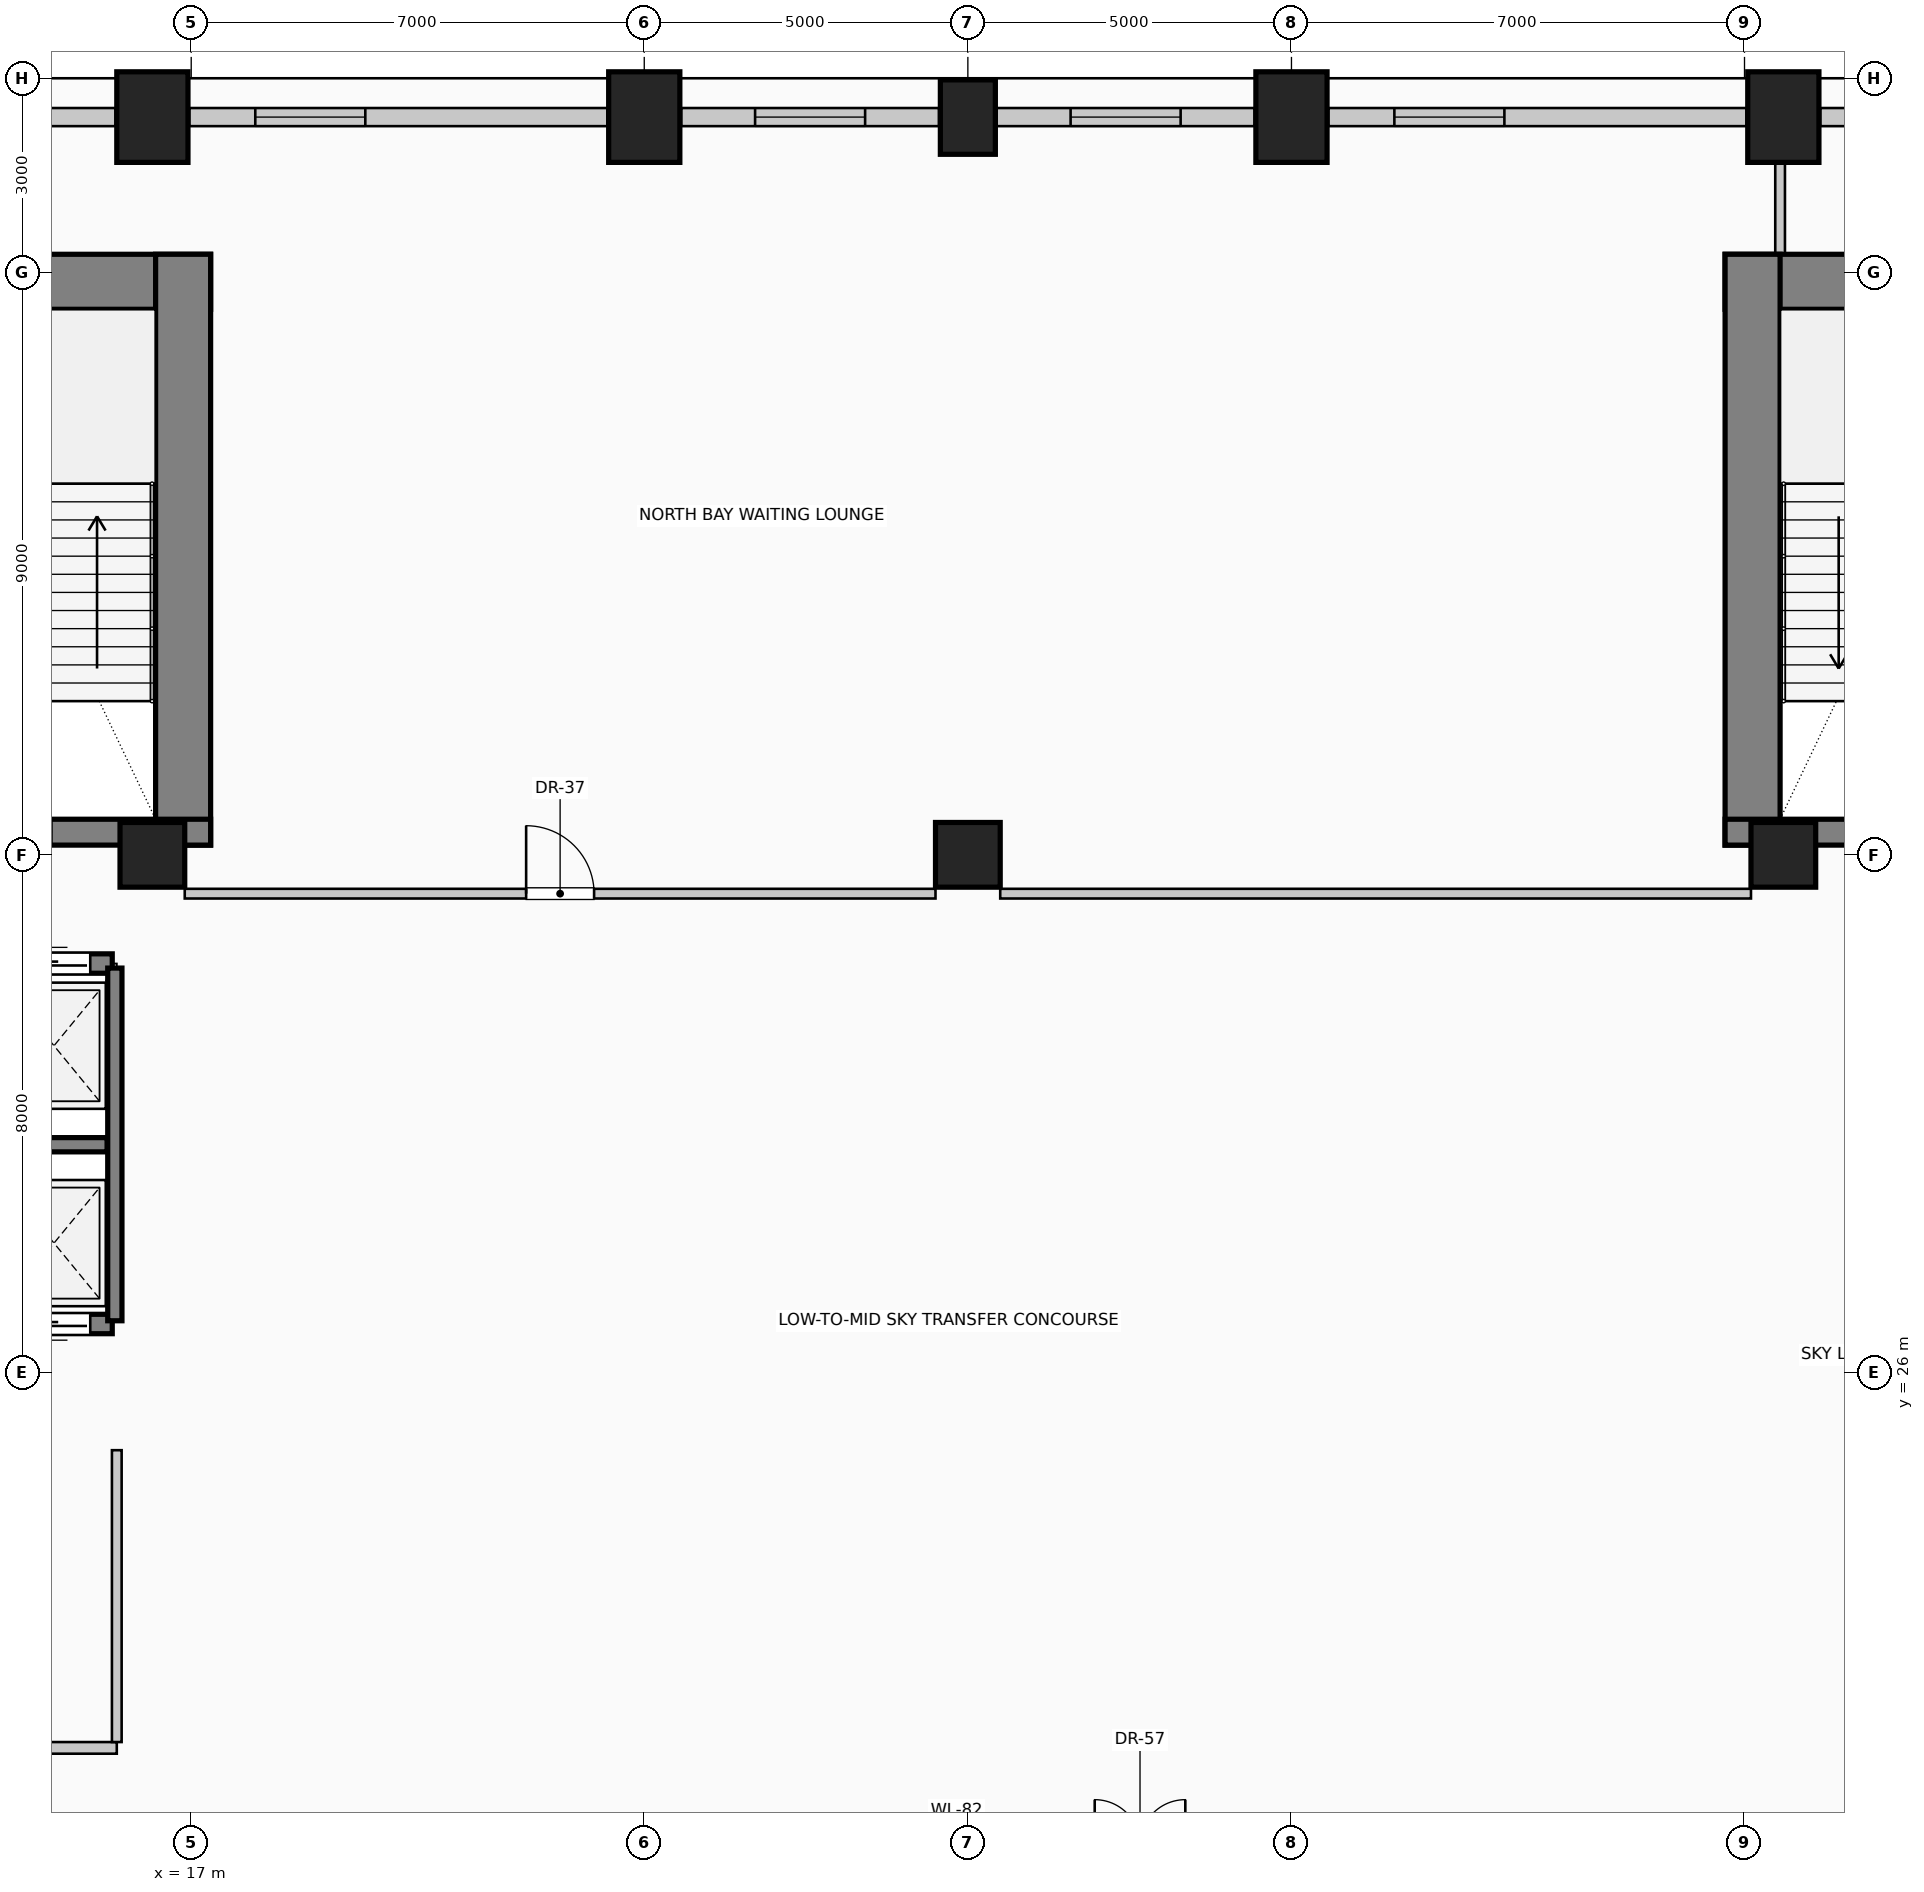
"""IFC4 building model, lengths in metres.
Left out: names, types, materials, properties, quantities, classifications, styles, units other than length and angle.
Written with IfcOpenShell. Run it as: python <this file> out.ifc"""

import sys

from ifc_helpers import new_model, si_unit, direction, frame, frame_2d, origin, origin_2d, place, context, subcontext, project, spatial, rectangle, circle, extrude, element, fill, save


model = new_model("IFC4")
c1 = context("Model", 3, precision=1e-05, world=origin(), true_north=direction((0.0, 1.0)))
c2 = subcontext(c1, "Body", "Model", "MODEL_VIEW")
j1 = project(units=[si_unit("LENGTHUNIT", "METRE"), si_unit("PLANEANGLEUNIT", "RADIAN")], contexts=[c1])
p1 = place(None, origin())
s1 = spatial("IfcSite", under=j1, at=p1, CompositionType="ELEMENT")
p2 = place(p1, origin())
s2 = spatial("IfcBuilding", under=s1, at=p2, CompositionType="ELEMENT")
p3 = place(p2, frame((0.0, 0.0, 87.8)))
s3 = spatial("IfcBuildingStorey", under=s2, at=p3, CompositionType="ELEMENT", Elevation=87.8)
p4 = place(p3, frame((2.7, 42.855, 0.0), z_axis=(0.0, 0.0, 1.0), x_axis=(1.0, 0.0, 0.0)))
e1 = element("IfcWall", 1, at=p4, inside=s3, PredefinedType="SHEAR", context=c2, shape_type="SweptSolid", body=[
    extrude(rectangle(XDim=14.6, YDim=0.85, at=frame_2d((7.3, 0.0))), origin(), (0.0, 0.0, 1.0), 4.8),
])
p5 = place(p3, frame((16.875, 34.15, 0.0), z_axis=(0.0, 0.0, 1.0), x_axis=(0.0, 1.0, 0.0)))
e2 = element("IfcWall", 2, at=p5, inside=s3, PredefinedType="SHEAR", context=c2, shape_type="SweptSolid", body=[
    extrude(rectangle(XDim=9.13, YDim=0.85, at=frame_2d((4.565, 0.0))), origin(), (0.0, 0.0, 1.0), 4.8),
])
p6 = place(p3, frame((12.29, 34.35, 0.0), z_axis=(0.0, 0.0, 1.0), x_axis=(1.0, 0.0, 0.0)))
e3 = element("IfcWall", 3, at=p6, inside=s3, PredefinedType="SHEAR", context=c2, shape_type="SweptSolid", body=[
    extrude(rectangle(XDim=5.01, YDim=0.4, at=frame_2d((2.505, 0.0))), origin(), (0.0, 0.0, 1.0), 4.8),
])
p7 = place(p6, frame((1.4, 0.0, 0.0)))
e4 = element("IfcOpeningElement", 4, at=p7, cuts=e3, PredefinedType="OPENING", context=c2, shape_type="SweptSolid", body=[
    extrude(rectangle(XDim=1.15, YDim=2.2, at=frame_2d((0.575, 1.1))), frame((0.0, 0.21, 0.0), z_axis=(0.0, -1.0, 0.0), x_axis=(1.0, 0.0, 0.0)), (0.0, 0.0, 1.0), 0.42),
])
p8 = place(p3, frame((40.7, 42.855, 0.0), z_axis=(0.0, 0.0, 1.0), x_axis=(1.0, 0.0, 0.0)))
e5 = element("IfcWall", 5, at=p8, inside=s3, PredefinedType="SHEAR", context=c2, shape_type="SweptSolid", body=[
    extrude(rectangle(XDim=14.6, YDim=0.85, at=frame_2d((7.3, 0.0))), origin(), (0.0, 0.0, 1.0), 4.8),
])
p9 = place(p3, frame((41.125, 34.15, 0.0), z_axis=(0.0, 0.0, 1.0), x_axis=(0.0, 1.0, 0.0)))
e6 = element("IfcWall", 6, at=p9, inside=s3, PredefinedType="SHEAR", context=c2, shape_type="SweptSolid", body=[
    extrude(rectangle(XDim=9.13, YDim=0.85, at=frame_2d((4.565, 0.0))), origin(), (0.0, 0.0, 1.0), 4.8),
])
p10 = place(p3, frame((40.7, 34.35, 0.0), z_axis=(0.0, 0.0, 1.0), x_axis=(1.0, 0.0, 0.0)))
e7 = element("IfcWall", 7, at=p10, inside=s3, PredefinedType="SHEAR", context=c2, shape_type="SweptSolid", body=[
    extrude(rectangle(XDim=5.01, YDim=0.4, at=frame_2d((2.505, 0.0))), origin(), (0.0, 0.0, 1.0), 4.8),
])
p11 = place(p10, frame((2.4, 0.0, 0.0)))
e8 = element("IfcOpeningElement", 8, at=p11, cuts=e7, PredefinedType="OPENING", context=c2, shape_type="SweptSolid", body=[
    extrude(rectangle(XDim=1.15, YDim=2.2, at=frame_2d((0.575, 1.1))), frame((0.0, 0.21, 0.0), z_axis=(0.0, -1.0, 0.0), x_axis=(1.0, 0.0, 0.0)), (0.0, 0.0, 1.0), 0.42),
])
for number, where, z_axis, x_axis in (
    (9, (16.4, 45.4, 0.0), (0.0, 0.0, 1.0), (1.0, 0.0, 0.0)),
    (10, (24.0, 45.4, 0.0), (0.0, 0.0, 1.0), (1.0, 0.0, 0.0)),
):
    element("IfcColumn", number, at=place(p3, frame(where, z_axis=z_axis, x_axis=x_axis)), inside=s3, PredefinedType="COLUMN", context=c2, shape_type="SweptSolid", body=[
        extrude(rectangle(XDim=1.1, YDim=1.4, at=origin_2d()), origin(), (0.0, 0.0, 1.0), 4.8),
    ])
p12 = place(p3, frame((29.0, 45.4, 0.0), z_axis=(0.0, 0.0, 1.0), x_axis=(1.0, 0.0, 0.0)))
e11 = element("IfcColumn", 11, at=p12, inside=s3, PredefinedType="COLUMN", context=c2, shape_type="SweptSolid", body=[
    extrude(rectangle(XDim=0.85, YDim=1.15, at=origin_2d()), origin(), (0.0, 0.0, 1.0), 4.8),
])
for number, where, z_axis, x_axis in (
    (12, (34.0, 45.4, 0.0), (0.0, 0.0, 1.0), (1.0, 0.0, 0.0)),
    (13, (41.6, 45.4, 0.0), (0.0, 0.0, 1.0), (1.0, 0.0, 0.0)),
):
    element("IfcColumn", number, at=place(p3, frame(where, z_axis=z_axis, x_axis=x_axis)), inside=s3, PredefinedType="COLUMN", context=c2, shape_type="SweptSolid", body=[
        extrude(rectangle(XDim=1.1, YDim=1.4, at=origin_2d()), origin(), (0.0, 0.0, 1.0), 4.8),
    ])
for number, where, z_axis, x_axis in (
    (14, (16.4, 34.0, 0.0), (0.0, 0.0, 1.0), (1.0, 0.0, 0.0)),
    (15, (29.0, 34.0, 0.0), (0.0, 0.0, 1.0), (1.0, 0.0, 0.0)),
    (16, (41.6, 34.0, 0.0), (0.0, 0.0, 1.0), (1.0, 0.0, 0.0)),
):
    element("IfcColumn", number, at=place(p3, frame(where, z_axis=z_axis, x_axis=x_axis)), inside=s3, PredefinedType="COLUMN", context=c2, shape_type="SweptSolid", body=[
        extrude(circle(Radius=0.5, at=origin_2d()), origin(), (0.0, 0.0, 1.0), 4.8),
    ])
p13 = place(p3, frame((14.445, 45.4, 0.0), z_axis=(0.0, 0.0, 1.0), x_axis=(1.0, 0.0, 0.0)))
e17 = element("IfcWall", 17, at=p13, inside=s3, PredefinedType="SOLIDWALL", context=c2, shape_type="SweptSolid", body=[
    extrude(rectangle(XDim=1.385, YDim=0.28, at=frame_2d((0.692, 0.0))), origin(), (0.0, 0.0, 1.0), 3.675),
])
p14 = place(p3, frame((16.97, 45.4, 0.0), z_axis=(0.0, 0.0, 1.0), x_axis=(1.0, 0.0, 0.0)))
e18 = element("IfcWall", 18, at=p14, inside=s3, PredefinedType="SOLIDWALL", context=c2, shape_type="SweptSolid", body=[
    extrude(rectangle(XDim=6.46, YDim=0.28, at=frame_2d((3.23, 0.0))), origin(), (0.0, 0.0, 1.0), 3.675),
])
p15 = place(p14, frame((1.02, 0.0, 0.5)))
e19 = element("IfcOpeningElement", 19, at=p15, cuts=e18, PredefinedType="OPENING", context=c2, shape_type="SweptSolid", body=[
    extrude(rectangle(XDim=1.7, YDim=1.95, at=frame_2d((0.85, 0.975))), frame((0.0, 0.15, 0.0), z_axis=(0.0, -1.0, 0.0), x_axis=(1.0, 0.0, 0.0)), (0.0, 0.0, 1.0), 0.3),
])
p16 = place(p3, frame((24.57, 45.4, 0.0), z_axis=(0.0, 0.0, 1.0), x_axis=(1.0, 0.0, 0.0)))
e20 = element("IfcWall", 20, at=p16, inside=s3, PredefinedType="SOLIDWALL", context=c2, shape_type="SweptSolid", body=[
    extrude(rectangle(XDim=3.985, YDim=0.28, at=frame_2d((1.992, 0.0))), origin(), (0.0, 0.0, 1.0), 3.675),
])
p17 = place(p16, frame((1.143, 0.0, 0.5)))
e21 = element("IfcOpeningElement", 21, at=p17, cuts=e20, PredefinedType="OPENING", context=c2, shape_type="SweptSolid", body=[
    extrude(rectangle(XDim=1.7, YDim=1.95, at=frame_2d((0.85, 0.975))), frame((0.0, 0.15, 0.0), z_axis=(0.0, -1.0, 0.0), x_axis=(1.0, 0.0, 0.0)), (0.0, 0.0, 1.0), 0.3),
])
p18 = place(p3, frame((29.445, 45.4, 0.0), z_axis=(0.0, 0.0, 1.0), x_axis=(1.0, 0.0, 0.0)))
e22 = element("IfcWall", 22, at=p18, inside=s3, PredefinedType="SOLIDWALL", context=c2, shape_type="SweptSolid", body=[
    extrude(rectangle(XDim=3.985, YDim=0.28, at=frame_2d((1.992, 0.0))), origin(), (0.0, 0.0, 1.0), 3.675),
])
p19 = place(p18, frame((1.143, 0.0, 0.5)))
e23 = element("IfcOpeningElement", 23, at=p19, cuts=e22, PredefinedType="OPENING", context=c2, shape_type="SweptSolid", body=[
    extrude(rectangle(XDim=1.7, YDim=1.95, at=frame_2d((0.85, 0.975))), frame((0.0, 0.15, 0.0), z_axis=(0.0, -1.0, 0.0), x_axis=(1.0, 0.0, 0.0)), (0.0, 0.0, 1.0), 0.3),
])
p20 = place(p3, frame((34.57, 45.4, 0.0), z_axis=(0.0, 0.0, 1.0), x_axis=(1.0, 0.0, 0.0)))
e24 = element("IfcWall", 24, at=p20, inside=s3, PredefinedType="SOLIDWALL", context=c2, shape_type="SweptSolid", body=[
    extrude(rectangle(XDim=6.46, YDim=0.28, at=frame_2d((3.23, 0.0))), origin(), (0.0, 0.0, 1.0), 3.675),
])
p21 = place(p20, frame((1.02, 0.0, 0.5)))
e25 = element("IfcOpeningElement", 25, at=p21, cuts=e24, PredefinedType="OPENING", context=c2, shape_type="SweptSolid", body=[
    extrude(rectangle(XDim=1.7, YDim=1.95, at=frame_2d((0.85, 0.975))), frame((0.0, 0.15, 0.0), z_axis=(0.0, -1.0, 0.0), x_axis=(1.0, 0.0, 0.0)), (0.0, 0.0, 1.0), 0.3),
])
p22 = place(p3, frame((42.17, 45.4, 0.0), z_axis=(0.0, 0.0, 1.0), x_axis=(1.0, 0.0, 0.0)))
e26 = element("IfcWall", 26, at=p22, inside=s3, PredefinedType="SOLIDWALL", context=c2, shape_type="SweptSolid", body=[
    extrude(rectangle(XDim=1.385, YDim=0.28, at=frame_2d((0.692, 0.0))), origin(), (0.0, 0.0, 1.0), 3.675),
])
p23 = place(p3, frame((15.78, 26.75, 0.0), z_axis=(0.0, 0.0, 1.0), x_axis=(-1.0, 0.0, 0.0)))
e27 = element("IfcWall", 27, at=p23, inside=s3, PredefinedType="SOLIDWALL", context=c2, shape_type="SweptSolid", body=[
    extrude(rectangle(XDim=1.78, YDim=0.3, at=frame_2d((0.89, 0.0))), origin(), (0.0, 0.0, 1.0), 4.8),
])
p24 = place(p23, frame((0.34, 0.0, 0.0)))
e28 = element("IfcOpeningElement", 28, at=p24, cuts=e27, PredefinedType="OPENING", context=c2, shape_type="SweptSolid", body=[
    extrude(rectangle(XDim=1.1, YDim=2.2, at=frame_2d((0.55, 1.1))), frame((0.0, 0.16, 0.0), z_axis=(0.0, -1.0, 0.0), x_axis=(1.0, 0.0, 0.0)), (0.0, 0.0, 1.0), 0.32),
])
p25 = place(p3, frame((14.0, 32.32, 0.0), z_axis=(0.0, 0.0, 1.0), x_axis=(1.0, 0.0, 0.0)))
e29 = element("IfcWall", 29, at=p25, inside=s3, PredefinedType="SOLIDWALL", context=c2, shape_type="SweptSolid", body=[
    extrude(rectangle(XDim=1.78, YDim=0.3, at=frame_2d((0.89, 0.0))), origin(), (0.0, 0.0, 1.0), 4.8),
])
p26 = place(p25, frame((0.34, 0.0, 0.0)))
e30 = element("IfcOpeningElement", 30, at=p26, cuts=e29, PredefinedType="OPENING", context=c2, shape_type="SweptSolid", body=[
    extrude(rectangle(XDim=1.1, YDim=2.2, at=frame_2d((0.55, 1.1))), frame((0.0, 0.16, 0.0), z_axis=(0.0, -1.0, 0.0), x_axis=(1.0, 0.0, 0.0)), (0.0, 0.0, 1.0), 0.32),
])
p27 = place(p3, frame((15.82, 26.8, 0.0), z_axis=(0.0, 0.0, 1.0), x_axis=(0.0, 1.0, 0.0)))
e31 = element("IfcWall", 31, at=p27, inside=s3, PredefinedType="SOLIDWALL", context=c2, shape_type="SweptSolid", body=[
    extrude(rectangle(XDim=5.45, YDim=0.22, at=frame_2d((2.725, 0.0))), origin(), (0.0, 0.0, 1.0), 4.8),
])
p28 = place(p3, frame((12.3, 29.52, 0.0), z_axis=(0.0, 0.0, 1.0), x_axis=(1.0, 0.0, 0.0)))
e32 = element("IfcWall", 32, at=p28, inside=s3, PredefinedType="SOLIDWALL", context=c2, shape_type="SweptSolid", body=[
    extrude(rectangle(XDim=3.4, YDim=0.22, at=frame_2d((1.7, 0.0))), origin(), (0.0, 0.0, 1.0), 4.8),
])
p29 = place(p3, frame((12.2, 20.2, 0.0), z_axis=(0.0, 0.0, 1.0), x_axis=(1.0, 0.0, 0.0)))
e33 = element("IfcWall", 33, at=p29, inside=s3, PredefinedType="PARTITIONING", context=c2, shape_type="SweptSolid", body=[
    extrude(rectangle(XDim=3.65, YDim=0.18, at=frame_2d((1.825, 0.0))), origin(), (0.0, 0.0, 1.0), 4.525),
])
p30 = place(p3, frame((16.9, 33.4, 0.0), z_axis=(0.0, 0.0, 1.0), x_axis=(1.0, 0.0, 0.0)))
e34 = element("IfcWall", 34, at=p30, inside=s3, PredefinedType="PARTITIONING", context=c2, shape_type="SweptSolid", body=[
    extrude(rectangle(XDim=11.6, YDim=0.15, at=frame_2d((5.8, 0.0))), origin(), (0.0, 0.0, 1.0), 4.525),
])
p31 = place(p30, frame((5.275, 0.0, 0.0)))
e35 = element("IfcOpeningElement", 35, at=p31, cuts=e34, PredefinedType="OPENING", context=c2, shape_type="SweptSolid", body=[
    extrude(rectangle(XDim=1.05, YDim=2.15, at=frame_2d((0.525, 1.075))), frame((0.0, 0.085, 0.0), z_axis=(0.0, -1.0, 0.0), x_axis=(1.0, 0.0, 0.0)), (0.0, 0.0, 1.0), 0.17),
])
p32 = place(p3, frame((29.5, 33.4, 0.0), z_axis=(0.0, 0.0, 1.0), x_axis=(1.0, 0.0, 0.0)))
e36 = element("IfcWall", 36, at=p32, inside=s3, PredefinedType="PARTITIONING", context=c2, shape_type="SweptSolid", body=[
    extrude(rectangle(XDim=11.6, YDim=0.15, at=frame_2d((5.8, 0.0))), origin(), (0.0, 0.0, 1.0), 4.525),
])
p33 = place(p3, frame((15.85, 20.29, 0.0), z_axis=(0.0, 0.0, 1.0), x_axis=(0.0, 1.0, 0.0)))
e37 = element("IfcWall", 37, at=p33, inside=s3, PredefinedType="PARTITIONING", context=c2, shape_type="SweptSolid", body=[
    extrude(rectangle(XDim=4.51, YDim=0.15, at=frame_2d((2.255, 0.0))), origin(), (0.0, 0.0, 1.0), 4.525),
])
p34 = place(p3, frame((41.55, 43.28, 0.0), z_axis=(0.0, 0.0, 1.0), x_axis=(0.0, 1.0, 0.0)))
e38 = element("IfcWall", 38, at=p34, inside=s3, PredefinedType="PARTITIONING", context=c2, shape_type="SweptSolid", body=[
    extrude(rectangle(XDim=1.42, YDim=0.15, at=frame_2d((0.71, 0.0))), origin(), (0.0, 0.0, 1.0), 4.525),
])
p35 = place(p15, origin())
e39 = element("IfcWindow", 39, at=p35, inside=s3, PartitioningType="SINGLE_PANEL", PredefinedType="WINDOW", context=c2, shape_type="SweptSolid", body=[
    extrude(rectangle(XDim=1.7, YDim=1.95, at=frame_2d((0.85, 0.975))), frame((0.0, 0.03, 0.0), z_axis=(0.0, -1.0, 0.0), x_axis=(1.0, 0.0, 0.0)), (0.0, 0.0, 1.0), 0.06),
])
fill(e19, e39)
p36 = place(p17, origin())
e40 = element("IfcWindow", 40, at=p36, inside=s3, PartitioningType="SINGLE_PANEL", PredefinedType="WINDOW", context=c2, shape_type="SweptSolid", body=[
    extrude(rectangle(XDim=1.7, YDim=1.95, at=frame_2d((0.85, 0.975))), frame((0.0, 0.03, 0.0), z_axis=(0.0, -1.0, 0.0), x_axis=(1.0, 0.0, 0.0)), (0.0, 0.0, 1.0), 0.06),
])
fill(e21, e40)
p37 = place(p19, origin())
e41 = element("IfcWindow", 41, at=p37, inside=s3, PartitioningType="SINGLE_PANEL", PredefinedType="WINDOW", context=c2, shape_type="SweptSolid", body=[
    extrude(rectangle(XDim=1.7, YDim=1.95, at=frame_2d((0.85, 0.975))), frame((0.0, 0.03, 0.0), z_axis=(0.0, -1.0, 0.0), x_axis=(1.0, 0.0, 0.0)), (0.0, 0.0, 1.0), 0.06),
])
fill(e23, e41)
p38 = place(p21, origin())
e42 = element("IfcWindow", 42, at=p38, inside=s3, PartitioningType="SINGLE_PANEL", PredefinedType="WINDOW", context=c2, shape_type="SweptSolid", body=[
    extrude(rectangle(XDim=1.7, YDim=1.95, at=frame_2d((0.85, 0.975))), frame((0.0, 0.03, 0.0), z_axis=(0.0, -1.0, 0.0), x_axis=(1.0, 0.0, 0.0)), (0.0, 0.0, 1.0), 0.06),
])
fill(e25, e42)
p39 = place(p24, origin())
e43 = element("IfcDoor", 43, at=p39, inside=s3, OperationType="SLIDING_TO_RIGHT", PredefinedType="DOOR", context=c2, shape_type="SweptSolid", body=[
    extrude(rectangle(XDim=1.1, YDim=2.2, at=frame_2d((0.55, 1.1))), frame((0.0, 0.025, 0.0), z_axis=(0.0, -1.0, 0.0), x_axis=(1.0, 0.0, 0.0)), (0.0, 0.0, 1.0), 0.05),
])
fill(e28, e43)
p40 = place(p26, origin())
e44 = element("IfcDoor", 44, at=p40, inside=s3, OperationType="SLIDING_TO_RIGHT", PredefinedType="DOOR", context=c2, shape_type="SweptSolid", body=[
    extrude(rectangle(XDim=1.1, YDim=2.2, at=frame_2d((0.55, 1.1))), frame((0.0, 0.025, 0.0), z_axis=(0.0, -1.0, 0.0), x_axis=(1.0, 0.0, 0.0)), (0.0, 0.0, 1.0), 0.05),
])
fill(e30, e44)
p41 = place(p31, origin())
e45 = element("IfcDoor", 45, at=p41, inside=s3, OperationType="SINGLE_SWING_LEFT", PredefinedType="DOOR", context=c2, shape_type="SweptSolid", body=[
    extrude(rectangle(XDim=1.05, YDim=2.15, at=frame_2d((0.525, 1.075))), frame((0.0, 0.025, 0.0), z_axis=(0.0, -1.0, 0.0), x_axis=(1.0, 0.0, 0.0)), (0.0, 0.0, 1.0), 0.05),
])
fill(e35, e45)
save(model, sys.argv[1])
